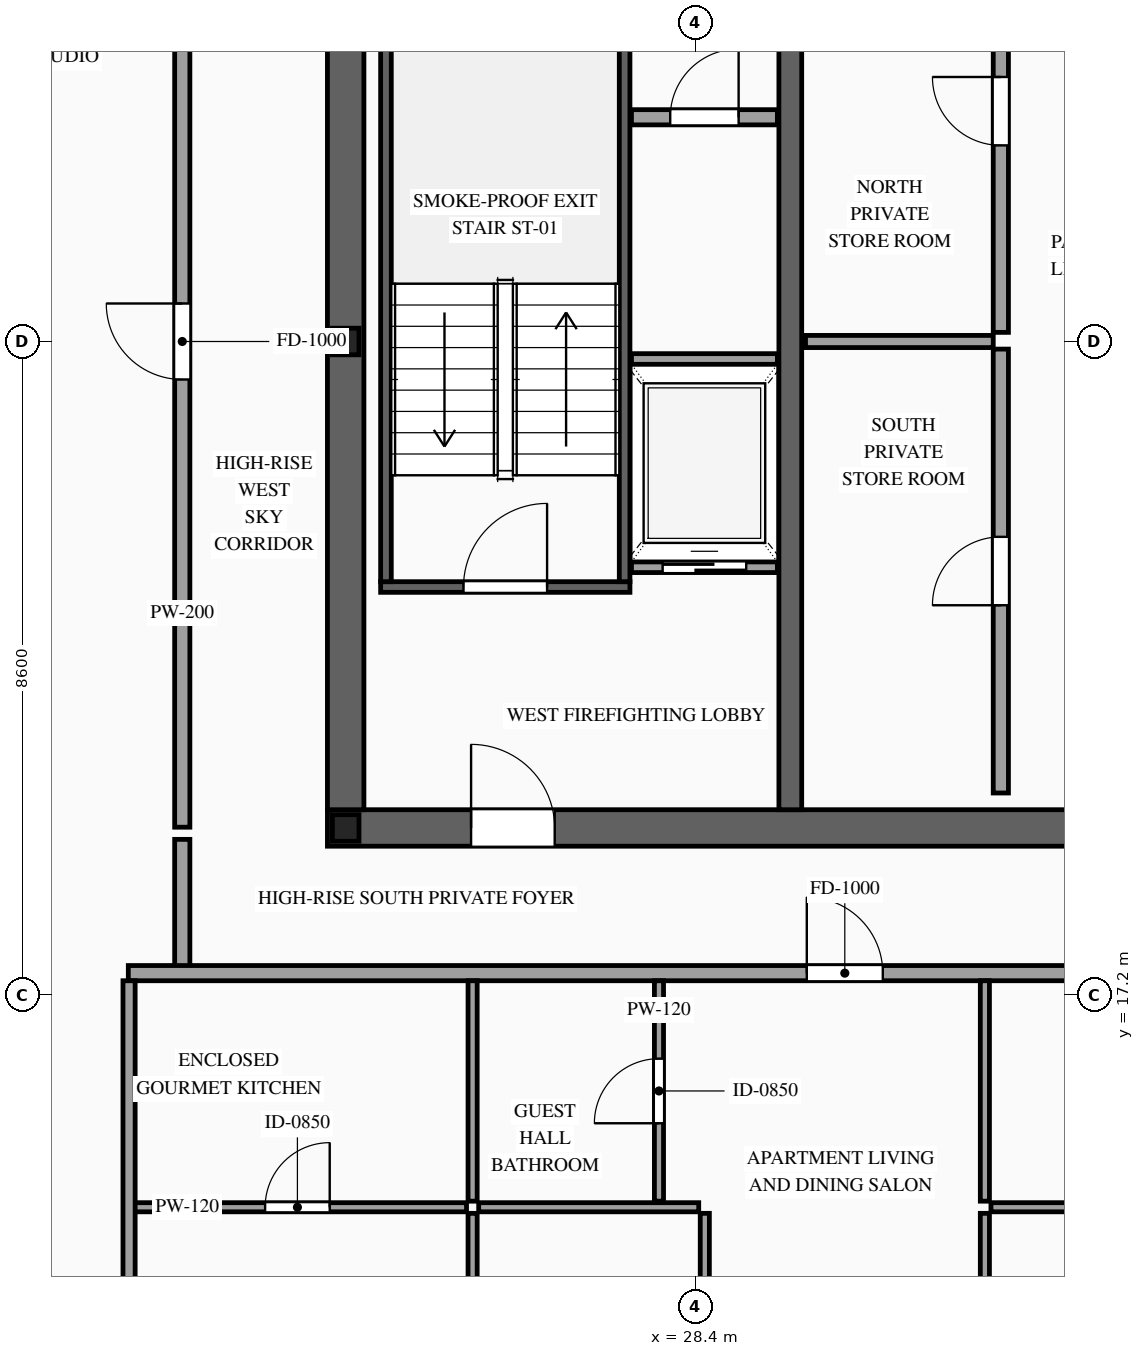
"""IFC4 building model, lengths in metres.
Left out: names, types, materials, properties, quantities, classifications, styles, units other than length and angle.
Written with IfcOpenShell. Run it as: python <this file> out.ifc"""

import sys

from ifc_helpers import new_model, si_unit, direction, frame, frame_2d, origin, origin_2d, place, context, subcontext, project, spatial, rectangle, i_section, extrude, source, transform, mapped, element, fill, save


model = new_model("IFC4")
c1 = context("Model", 3, precision=1e-05, world=origin(), true_north=direction((0.0, 1.0)))
c2 = subcontext(c1, "Body", "Model", "MODEL_VIEW")
j1 = project(units=[si_unit("LENGTHUNIT", "METRE"), si_unit("PLANEANGLEUNIT", "RADIAN")], contexts=[c1])
p1 = place(None, origin())
s1 = spatial("IfcSite", under=j1, at=p1, CompositionType="ELEMENT")
p2 = place(p1, origin())
s2 = spatial("IfcBuilding", under=s1, at=p2, CompositionType="ELEMENT")
p3 = place(p2, frame((0.0, 0.0, 303.1)))
s3 = spatial("IfcBuildingStorey", under=s2, at=p3, CompositionType="ELEMENT", Elevation=303.1)
p4 = place(p3, frame((23.56, 19.4, 0.0), z_axis=(0.0, 0.0, 1.0), x_axis=(1.0, 0.0, 0.0)))
e1 = element("IfcWall", 1, at=p4, inside=s3, PredefinedType="SHEAR", context=c2, shape_type="SweptSolid", body=[
    extrude(rectangle(XDim=26.88, YDim=0.48, at=frame_2d((13.44, 0.0))), origin(), (0.0, 0.0, 1.0), 3.5),
])
p5 = place(p4, frame((1.89, 0.0, 0.0)))
e2 = element("IfcOpeningElement", 2, at=p5, cuts=e1, PredefinedType="OPENING", context=c2, shape_type="SweptSolid", body=[
    extrude(rectangle(XDim=1.1, YDim=2.2, at=frame_2d((0.55, 1.1))), frame((0.0, 0.255, 0.0), z_axis=(0.0, -1.0, 0.0), x_axis=(1.0, 0.0, 0.0)), (0.0, 0.0, 1.0), 0.51),
])
p6 = place(p4, frame((9.79, 0.0, 0.0)))
e3 = element("IfcOpeningElement", 3, at=p6, cuts=e1, PredefinedType="OPENING", context=c2, shape_type="SweptSolid", body=[
    extrude(rectangle(XDim=1.1, YDim=2.2, at=frame_2d((0.55, 1.1))), frame((0.0, 0.255, 0.0), z_axis=(0.0, -1.0, 0.0), x_axis=(1.0, 0.0, 0.0)), (0.0, 0.0, 1.0), 0.51),
])
p7 = place(p4, frame((22.99, 0.0, 0.0)))
e4 = element("IfcOpeningElement", 4, at=p7, cuts=e1, PredefinedType="OPENING", context=c2, shape_type="SweptSolid", body=[
    extrude(rectangle(XDim=1.1, YDim=2.2, at=frame_2d((0.55, 1.1))), frame((0.0, 0.255, 0.0), z_axis=(0.0, -1.0, 0.0), x_axis=(1.0, 0.0, 0.0)), (0.0, 0.0, 1.0), 0.51),
])
p8 = place(p4, frame((19.61, 0.0, 0.0)))
e5 = element("IfcOpeningElement", 5, at=p8, cuts=e1, PredefinedType="OPENING", context=c2, shape_type="SweptSolid", body=[
    extrude(rectangle(XDim=0.9, YDim=2.15, at=frame_2d((0.45, 1.075))), frame((0.0, 0.255, 0.0), z_axis=(0.0, -1.0, 0.0), x_axis=(1.0, 0.0, 0.0)), (0.0, 0.0, 1.0), 0.51),
])
p9 = place(p4, frame((18.17, 0.0, 0.0)))
e6 = element("IfcOpeningElement", 6, at=p9, cuts=e1, PredefinedType="OPENING", context=c2, shape_type="SweptSolid", body=[
    extrude(rectangle(XDim=0.9, YDim=2.15, at=frame_2d((0.45, 1.075))), frame((0.0, 0.255, 0.0), z_axis=(0.0, -1.0, 0.0), x_axis=(1.0, 0.0, 0.0)), (0.0, 0.0, 1.0), 0.51),
])
m1 = source(origin(), c2, "Body", "SweptSolid", [
    extrude(rectangle(XDim=12.32, YDim=0.48, at=frame_2d((6.16, 0.0))), origin(), (0.0, 0.0, 1.0), 3.5),
])
p10 = place(p3, frame((23.8, 19.64, 0.0), z_axis=(0.0, 0.0, 1.0), x_axis=(0.0, 1.0, 0.0)))
e7 = element("IfcWall", 7, at=p10, inside=s3, PredefinedType="SHEAR", context=c2, shape_type="MappedRepresentation", body=[
    mapped(m1, transform((0.0, 0.0, 0.0), scale=1.0)),
])
m2 = source(origin(), c2, "Body", "SweptSolid", [
    extrude(rectangle(XDim=12.32, YDim=0.3, at=frame_2d((6.16, 0.0))), origin(), (0.0, 0.0, 1.0), 3.5),
])
p11 = place(p3, frame((29.65, 19.64, 0.0), z_axis=(0.0, 0.0, 1.0), x_axis=(0.0, 1.0, 0.0)))
e8 = element("IfcWall", 8, at=p11, inside=s3, PredefinedType="SOLIDWALL", context=c2, shape_type="MappedRepresentation", body=[
    mapped(m2, transform((0.0, 0.0, 0.0), scale=1.0)),
])
m3 = source(origin(), c2, "Body", "SweptSolid", [
    extrude(i_section(OverallWidth=0.35, OverallDepth=0.35, WebThickness=0.012, FlangeThickness=0.019, at=origin_2d()), origin(), (0.0, 0.0, 1.0), 3.5),
])
for number, where, z_axis, x_axis in (
    (9, (23.8, 19.4, 0.0), (0.0, 0.0, 1.0), (1.0, 0.0, 0.0)),
    (10, (23.8, 25.8, 0.0), (0.0, 0.0, 1.0), (1.0, 0.0, 0.0)),
):
    element("IfcColumn", number, at=place(p3, frame(where, z_axis=z_axis, x_axis=x_axis)), inside=s3, PredefinedType="COLUMN", context=c2, shape_type="MappedRepresentation", body=[
        mapped(m3, transform((0.0, 0.0, 0.0), scale=1.0)),
    ])
p12 = place(p3, frame((27.56, 22.83, 0.0), z_axis=(0.0, 0.0, 1.0), x_axis=(1.0, 0.0, 0.0)))
e11 = element("IfcWall", 11, at=p12, inside=s3, PredefinedType="SOLIDWALL", context=c2, shape_type="SweptSolid", body=[
    extrude(rectangle(XDim=1.92, YDim=0.14, at=frame_2d((0.96, 0.0))), origin(), (0.0, 0.0, 1.0), 3.22),
])
p13 = place(p12, frame((0.41, 0.0, 0.0)))
e12 = element("IfcOpeningElement", 12, at=p13, cuts=e11, PredefinedType="OPENING", context=c2, shape_type="SweptSolid", body=[
    extrude(rectangle(XDim=1.1, YDim=2.2, at=frame_2d((0.55, 1.1))), frame((0.0, 0.085, 0.0), z_axis=(0.0, -1.0, 0.0), x_axis=(1.0, 0.0, 0.0)), (0.0, 0.0, 1.0), 0.17),
])
m4 = source(origin(), c2, "Body", "SweptSolid", [
    extrude(rectangle(XDim=1.92, YDim=0.14, at=frame_2d((0.96, 0.0))), origin(), (0.0, 0.0, 1.0), 3.22),
])
p14 = place(p3, frame((27.56, 25.57, 0.0), z_axis=(0.0, 0.0, 1.0), x_axis=(1.0, 0.0, 0.0)))
e13 = element("IfcWall", 13, at=p14, inside=s3, PredefinedType="SOLIDWALL", context=c2, shape_type="MappedRepresentation", body=[
    mapped(m4, transform((0.0, 0.0, 0.0), scale=1.0)),
])
p15 = place(p3, frame((24.26, 22.57, 0.0), z_axis=(0.0, 0.0, 1.0), x_axis=(1.0, 0.0, 0.0)))
e14 = element("IfcWall", 14, at=p15, inside=s3, PredefinedType="SOLIDWALL", context=c2, shape_type="SweptSolid", body=[
    extrude(rectangle(XDim=3.28, YDim=0.14, at=frame_2d((1.64, 0.0))), origin(), (0.0, 0.0, 1.0), 3.22),
])
p16 = place(p15, frame((1.09, 0.0, 0.0)))
e15 = element("IfcOpeningElement", 15, at=p16, cuts=e14, PredefinedType="OPENING", context=c2, shape_type="SweptSolid", body=[
    extrude(rectangle(XDim=1.1, YDim=2.2, at=frame_2d((0.55, 1.1))), frame((0.0, 0.085, 0.0), z_axis=(0.0, -1.0, 0.0), x_axis=(1.0, 0.0, 0.0)), (0.0, 0.0, 1.0), 0.17),
])
m5 = source(origin(), c2, "Body", "SweptSolid", [
    extrude(rectangle(XDim=8.94, YDim=0.14, at=frame_2d((4.47, 0.0))), origin(), (0.0, 0.0, 1.0), 3.22),
])
for number, where, z_axis, x_axis in (
    (16, (24.33, 22.64, 0.0), (0.0, 0.0, 1.0), (0.0, 1.0, 0.0)),
    (17, (27.47, 22.64, 0.0), (0.0, 0.0, 1.0), (0.0, 1.0, 0.0)),
):
    element("IfcWall", number, at=place(p3, frame(where, z_axis=z_axis, x_axis=x_axis)), inside=s3, PredefinedType="SOLIDWALL", context=c2, shape_type="MappedRepresentation", body=[
        mapped(m5, transform((0.0, 0.0, 0.0), scale=1.0)),
    ])
p17 = place(p3, frame((27.56, 28.75, 0.0), z_axis=(0.0, 0.0, 1.0), x_axis=(1.0, 0.0, 0.0)))
e18 = element("IfcWall", 18, at=p17, inside=s3, PredefinedType="PARTITIONING", context=c2, shape_type="SweptSolid", body=[
    extrude(rectangle(XDim=1.92, YDim=0.2, at=frame_2d((0.96, 0.0))), origin(), (0.0, 0.0, 1.0), 3.22),
])
p18 = place(p17, frame((0.51, 0.0, 0.0)))
e19 = element("IfcOpeningElement", 19, at=p18, cuts=e18, PredefinedType="OPENING", context=c2, shape_type="SweptSolid", body=[
    extrude(rectangle(XDim=0.9, YDim=2.15, at=frame_2d((0.45, 1.075))), frame((0.0, 0.115, 0.0), z_axis=(0.0, -1.0, 0.0), x_axis=(1.0, 0.0, 0.0)), (0.0, 0.0, 1.0), 0.23),
])
p19 = place(p3, frame((32.42, 19.86, 0.0), z_axis=(0.0, 0.0, 1.0), x_axis=(0.0, 1.0, 0.0)))
e20 = element("IfcWall", 20, at=p19, inside=s3, PredefinedType="PARTITIONING", context=c2, shape_type="SweptSolid", body=[
    extrude(rectangle(XDim=5.84, YDim=0.2, at=frame_2d((2.92, 0.0))), origin(), (0.0, 0.0, 1.0), 3.22),
])
p20 = place(p19, frame((2.47, 0.0, 0.0)))
e21 = element("IfcOpeningElement", 21, at=p20, cuts=e20, PredefinedType="OPENING", context=c2, shape_type="SweptSolid", body=[
    extrude(rectangle(XDim=0.9, YDim=2.15, at=frame_2d((0.45, 1.075))), frame((0.0, 0.115, 0.0), z_axis=(0.0, -1.0, 0.0), x_axis=(1.0, 0.0, 0.0)), (0.0, 0.0, 1.0), 0.23),
])
p21 = place(p3, frame((32.42, 25.92, 0.0), z_axis=(0.0, 0.0, 1.0), x_axis=(0.0, 1.0, 0.0)))
e22 = element("IfcWall", 22, at=p21, inside=s3, PredefinedType="PARTITIONING", context=c2, shape_type="SweptSolid", body=[
    extrude(rectangle(XDim=5.82, YDim=0.2, at=frame_2d((2.91, 0.0))), origin(), (0.0, 0.0, 1.0), 3.22),
])
p22 = place(p21, frame((2.46, 0.0, 0.0)))
e23 = element("IfcOpeningElement", 23, at=p22, cuts=e22, PredefinedType="OPENING", context=c2, shape_type="SweptSolid", body=[
    extrude(rectangle(XDim=0.9, YDim=2.15, at=frame_2d((0.45, 1.075))), frame((0.0, 0.115, 0.0), z_axis=(0.0, -1.0, 0.0), x_axis=(1.0, 0.0, 0.0)), (0.0, 0.0, 1.0), 0.23),
])
m6 = source(origin(), c2, "Body", "SweptSolid", [
    extrude(rectangle(XDim=2.47, YDim=0.16, at=frame_2d((1.235, 0.0))), origin(), (0.0, 0.0, 1.0), 3.22),
])
p23 = place(p3, frame((29.85, 25.8, 0.0), z_axis=(0.0, 0.0, 1.0), x_axis=(1.0, 0.0, 0.0)))
e24 = element("IfcWall", 24, at=p23, inside=s3, PredefinedType="PARTITIONING", context=c2, shape_type="MappedRepresentation", body=[
    mapped(m6, transform((0.0, 0.0, 0.0), scale=1.0)),
])
m7 = source(origin(), c2, "Body", "SweptSolid", [
    extrude(rectangle(XDim=1.7, YDim=0.2, at=frame_2d((0.85, 0.0))), origin(), (0.0, 0.0, 1.0), 3.22),
])
p24 = place(p3, frame((21.65, 17.55, 0.0), z_axis=(0.0, 0.0, 1.0), x_axis=(0.0, 1.0, 0.0)))
e25 = element("IfcWall", 25, at=p24, inside=s3, PredefinedType="PARTITIONING", context=c2, shape_type="MappedRepresentation", body=[
    mapped(m7, transform((0.0, 0.0, 0.0), scale=1.0)),
])
p25 = place(p3, frame((20.94, 17.49, 0.0), z_axis=(0.0, 0.0, 1.0), x_axis=(1.0, 0.0, 0.0)))
e26 = element("IfcWall", 26, at=p25, inside=s3, PredefinedType="PARTITIONING", context=c2, shape_type="SweptSolid", body=[
    extrude(rectangle(XDim=15.338, YDim=0.2, at=frame_2d((7.669, 0.0))), origin(), (0.0, 0.0, 1.0), 3.22),
])
p26 = place(p25, frame((8.927, 0.0, 0.0)))
e27 = element("IfcOpeningElement", 27, at=p26, cuts=e26, PredefinedType="OPENING", context=c2, shape_type="SweptSolid", body=[
    extrude(rectangle(XDim=1.0, YDim=2.2, at=frame_2d((0.5, 1.1))), frame((0.0, 0.115, 0.0), z_axis=(0.0, -1.0, 0.0), x_axis=(1.0, 0.0, 0.0)), (0.0, 0.0, 1.0), 0.23),
])
p27 = place(p3, frame((20.94, 14.41, 0.0), z_axis=(0.0, 0.0, 1.0), x_axis=(1.0, 0.0, 0.0)))
e28 = element("IfcWall", 28, at=p27, inside=s3, PredefinedType="PARTITIONING", context=c2, shape_type="SweptSolid", body=[
    extrude(rectangle(XDim=4.45, YDim=0.12, at=frame_2d((2.225, 0.0))), origin(), (0.0, 0.0, 1.0), 3.22),
])
p28 = place(p27, frame((1.8, 0.0, 0.0)))
e29 = element("IfcOpeningElement", 29, at=p28, cuts=e28, PredefinedType="OPENING", context=c2, shape_type="SweptSolid", body=[
    extrude(rectangle(XDim=0.85, YDim=2.1, at=frame_2d((0.425, 1.05))), frame((0.0, 0.075, 0.0), z_axis=(0.0, -1.0, 0.0), x_axis=(1.0, 0.0, 0.0)), (0.0, 0.0, 1.0), 0.15),
])
m8 = source(origin(), c2, "Body", "SweptSolid", [
    extrude(rectangle(XDim=2.9, YDim=0.12, at=frame_2d((1.45, 0.0))), origin(), (0.0, 0.0, 1.0), 3.22),
])
p29 = place(p3, frame((25.47, 14.49, 0.0), z_axis=(0.0, 0.0, 1.0), x_axis=(0.0, 1.0, 0.0)))
e30 = element("IfcWall", 30, at=p29, inside=s3, PredefinedType="PARTITIONING", context=c2, shape_type="MappedRepresentation", body=[
    mapped(m8, transform((0.0, 0.0, 0.0), scale=1.0)),
])
p30 = place(p3, frame((27.922, 14.49, 0.0), z_axis=(0.0, 0.0, 1.0), x_axis=(0.0, 1.0, 0.0)))
e31 = element("IfcWall", 31, at=p30, inside=s3, PredefinedType="PARTITIONING", context=c2, shape_type="SweptSolid", body=[
    extrude(rectangle(XDim=2.9, YDim=0.12, at=frame_2d((1.45, 0.0))), origin(), (0.0, 0.0, 1.0), 3.22),
])
p31 = place(p30, frame((1.025, 0.0, 0.0)))
e32 = element("IfcOpeningElement", 32, at=p31, cuts=e31, PredefinedType="OPENING", context=c2, shape_type="SweptSolid", body=[
    extrude(rectangle(XDim=0.85, YDim=2.1, at=frame_2d((0.425, 1.05))), frame((0.0, 0.075, 0.0), z_axis=(0.0, -1.0, 0.0), x_axis=(1.0, 0.0, 0.0)), (0.0, 0.0, 1.0), 0.15),
])
p32 = place(p3, frame((32.29, 14.41, 0.0), z_axis=(0.0, 0.0, 1.0), x_axis=(1.0, 0.0, 0.0)))
e33 = element("IfcWall", 33, at=p32, inside=s3, PredefinedType="PARTITIONING", context=c2, shape_type="SweptSolid", body=[
    extrude(rectangle(XDim=3.988, YDim=0.12, at=frame_2d((1.994, 0.0))), origin(), (0.0, 0.0, 1.0), 3.22),
])
p33 = place(p32, frame((1.569, 0.0, 0.0)))
e34 = element("IfcOpeningElement", 34, at=p33, cuts=e33, PredefinedType="OPENING", context=c2, shape_type="SweptSolid", body=[
    extrude(rectangle(XDim=0.85, YDim=2.1, at=frame_2d((0.425, 1.05))), frame((0.0, 0.075, 0.0), z_axis=(0.0, -1.0, 0.0), x_axis=(1.0, 0.0, 0.0)), (0.0, 0.0, 1.0), 0.15),
])
p34 = place(p3, frame((32.21, 14.49, 0.0), z_axis=(0.0, 0.0, 1.0), x_axis=(0.0, 1.0, 0.0)))
e35 = element("IfcWall", 35, at=p34, inside=s3, PredefinedType="PARTITIONING", context=c2, shape_type="MappedRepresentation", body=[
    mapped(m8, transform((0.0, 0.0, 0.0), scale=1.0)),
])
p35 = place(p3, frame((25.47, 6.85, 0.0), z_axis=(0.0, 0.0, 1.0), x_axis=(0.0, 1.0, 0.0)))
e36 = element("IfcWall", 36, at=p35, inside=s3, PredefinedType="PARTITIONING", context=c2, shape_type="SweptSolid", body=[
    extrude(rectangle(XDim=7.48, YDim=0.12, at=frame_2d((3.74, 0.0))), origin(), (0.0, 0.0, 1.0), 3.22),
])
p36 = place(p35, frame((3.29, 0.0, 0.0)))
e37 = element("IfcOpeningElement", 37, at=p36, cuts=e36, PredefinedType="OPENING", context=c2, shape_type="SweptSolid", body=[
    extrude(rectangle(XDim=0.9, YDim=2.15, at=frame_2d((0.45, 1.075))), frame((0.0, 0.075, 0.0), z_axis=(0.0, -1.0, 0.0), x_axis=(1.0, 0.0, 0.0)), (0.0, 0.0, 1.0), 0.15),
])
p37 = place(p3, frame((32.21, 6.85, 0.0), z_axis=(0.0, 0.0, 1.0), x_axis=(0.0, 1.0, 0.0)))
e38 = element("IfcWall", 38, at=p37, inside=s3, PredefinedType="PARTITIONING", context=c2, shape_type="SweptSolid", body=[
    extrude(rectangle(XDim=7.48, YDim=0.12, at=frame_2d((3.74, 0.0))), origin(), (0.0, 0.0, 1.0), 3.22),
])
p38 = place(p37, frame((3.29, 0.0, 0.0)))
e39 = element("IfcOpeningElement", 39, at=p38, cuts=e38, PredefinedType="OPENING", context=c2, shape_type="SweptSolid", body=[
    extrude(rectangle(XDim=0.9, YDim=2.15, at=frame_2d((0.45, 1.075))), frame((0.0, 0.075, 0.0), z_axis=(0.0, -1.0, 0.0), x_axis=(1.0, 0.0, 0.0)), (0.0, 0.0, 1.0), 0.15),
])
m9 = source(origin(), c2, "Body", "SweptSolid", [
    extrude(rectangle(XDim=2.895, YDim=0.12, at=frame_2d((1.448, 0.0))), origin(), (0.0, 0.0, 1.0), 3.22),
])
p39 = place(p3, frame((25.55, 14.41, 0.0), z_axis=(0.0, 0.0, 1.0), x_axis=(1.0, 0.0, 0.0)))
e40 = element("IfcWall", 40, at=p39, inside=s3, PredefinedType="PARTITIONING", context=c2, shape_type="MappedRepresentation", body=[
    mapped(m9, transform((0.0, 0.0, 0.0), scale=1.0)),
])
p40 = place(p3, frame((28.525, 6.85, 0.0), z_axis=(0.0, 0.0, 1.0), x_axis=(0.0, 1.0, 0.0)))
e41 = element("IfcWall", 41, at=p40, inside=s3, PredefinedType="PARTITIONING", context=c2, shape_type="SweptSolid", body=[
    extrude(rectangle(XDim=7.48, YDim=0.12, at=frame_2d((3.74, 0.0))), origin(), (0.0, 0.0, 1.0), 3.22),
])
p41 = place(p40, frame((3.29, 0.0, 0.0)))
e42 = element("IfcOpeningElement", 42, at=p41, cuts=e41, PredefinedType="OPENING", context=c2, shape_type="SweptSolid", body=[
    extrude(rectangle(XDim=0.9, YDim=2.15, at=frame_2d((0.45, 1.075))), frame((0.0, 0.075, 0.0), z_axis=(0.0, -1.0, 0.0), x_axis=(1.0, 0.0, 0.0)), (0.0, 0.0, 1.0), 0.15),
])
m10 = source(origin(), c2, "Body", "SweptSolid", [
    extrude(rectangle(XDim=10.39, YDim=0.16, at=frame_2d((5.195, 0.0))), origin(), (0.0, 0.0, 1.0), 3.22),
])
p42 = place(p3, frame((20.95, 7.0, 0.0), z_axis=(0.0, 0.0, 1.0), x_axis=(0.0, 1.0, 0.0)))
e43 = element("IfcWall", 43, at=p42, inside=s3, PredefinedType="PARTITIONING", context=c2, shape_type="MappedRepresentation", body=[
    mapped(m10, transform((0.0, 0.0, 0.0), scale=1.0)),
])
p43 = place(p3, frame((21.65, 19.41, 0.0), z_axis=(0.0, 0.0, 1.0), x_axis=(0.0, 1.0, 0.0)))
e44 = element("IfcWall", 44, at=p43, inside=s3, PredefinedType="PARTITIONING", context=c2, shape_type="SweptSolid", body=[
    extrude(rectangle(XDim=12.78, YDim=0.2, at=frame_2d((6.39, 0.0))), origin(), (0.0, 0.0, 1.0), 3.22),
])
p44 = place(p43, frame((5.89, 0.0, 0.0)))
e45 = element("IfcOpeningElement", 45, at=p44, cuts=e44, PredefinedType="OPENING", context=c2, shape_type="SweptSolid", body=[
    extrude(rectangle(XDim=1.0, YDim=2.2, at=frame_2d((0.5, 1.1))), frame((0.0, 0.115, 0.0), z_axis=(0.0, -1.0, 0.0), x_axis=(1.0, 0.0, 0.0)), (0.0, 0.0, 1.0), 0.23),
])
m11 = source(origin(), c2, "Body", "SweptSolid", [
    extrude(rectangle(XDim=1.1, YDim=2.2, at=frame_2d((0.55, 1.1))), frame((0.0, 0.025, 0.0), z_axis=(0.0, -1.0, 0.0), x_axis=(1.0, 0.0, 0.0)), (0.0, 0.0, 1.0), 0.05),
])
p45 = place(p13, origin())
e46 = element("IfcDoor", 46, at=p45, inside=s3, OperationType="SLIDING_TO_LEFT", PredefinedType="DOOR", context=c2, shape_type="MappedRepresentation", body=[
    mapped(m11, transform((0.0, 0.0, 0.0), scale=1.0)),
])
fill(e12, e46)
m12 = source(origin(), c2, "Body", "SweptSolid", [
    extrude(rectangle(XDim=1.1, YDim=2.2, at=frame_2d((0.55, 1.1))), frame((0.0, 0.025, 0.0), z_axis=(0.0, -1.0, 0.0), x_axis=(1.0, 0.0, 0.0)), (0.0, 0.0, 1.0), 0.05),
])
p46 = place(p16, origin())
e47 = element("IfcDoor", 47, at=p46, inside=s3, OperationType="SINGLE_SWING_RIGHT", PredefinedType="DOOR", context=c2, shape_type="MappedRepresentation", body=[
    mapped(m12, transform((0.0, 0.0, 0.0), scale=1.0)),
])
fill(e15, e47)
p47 = place(p5, origin())
e48 = element("IfcDoor", 48, at=p47, inside=s3, OperationType="SINGLE_SWING_LEFT", PredefinedType="DOOR", context=c2, shape_type="MappedRepresentation", body=[
    mapped(m12, transform((0.0, 0.0, 0.0), scale=1.0)),
])
fill(e2, e48)
m13 = source(origin(), c2, "Body", "SweptSolid", [
    extrude(rectangle(XDim=0.9, YDim=2.15, at=frame_2d((0.45, 1.075))), frame((0.0, 0.025, 0.0), z_axis=(0.0, -1.0, 0.0), x_axis=(1.0, 0.0, 0.0)), (0.0, 0.0, 1.0), 0.05),
])
p48 = place(p18, origin())
e49 = element("IfcDoor", 49, at=p48, inside=s3, OperationType="SINGLE_SWING_RIGHT", PredefinedType="DOOR", context=c2, shape_type="MappedRepresentation", body=[
    mapped(m13, transform((0.0, 0.0, 0.0), scale=1.0)),
])
fill(e19, e49)
p49 = place(p20, origin())
e50 = element("IfcDoor", 50, at=p49, inside=s3, OperationType="SINGLE_SWING_LEFT", PredefinedType="DOOR", context=c2, shape_type="MappedRepresentation", body=[
    mapped(m13, transform((0.0, 0.0, 0.0), scale=1.0)),
])
fill(e21, e50)
p50 = place(p22, origin())
e51 = element("IfcDoor", 51, at=p50, inside=s3, OperationType="SINGLE_SWING_RIGHT", PredefinedType="DOOR", context=c2, shape_type="MappedRepresentation", body=[
    mapped(m13, transform((0.0, 0.0, 0.0), scale=1.0)),
])
fill(e23, e51)
m14 = source(origin(), c2, "Body", "SweptSolid", [
    extrude(rectangle(XDim=1.0, YDim=2.2, at=frame_2d((0.5, 1.1))), frame((0.0, 0.025, 0.0), z_axis=(0.0, -1.0, 0.0), x_axis=(1.0, 0.0, 0.0)), (0.0, 0.0, 1.0), 0.05),
])
p51 = place(p26, origin())
e52 = element("IfcDoor", 52, at=p51, inside=s3, OperationType="SINGLE_SWING_LEFT", PredefinedType="DOOR", context=c2, shape_type="MappedRepresentation", body=[
    mapped(m14, transform((0.0, 0.0, 0.0), scale=1.0)),
])
fill(e27, e52)
m15 = source(origin(), c2, "Body", "SweptSolid", [
    extrude(rectangle(XDim=0.85, YDim=2.1, at=frame_2d((0.425, 1.05))), frame((0.0, 0.025, 0.0), z_axis=(0.0, -1.0, 0.0), x_axis=(1.0, 0.0, 0.0)), (0.0, 0.0, 1.0), 0.05),
])
p52 = place(p28, origin())
e53 = element("IfcDoor", 53, at=p52, inside=s3, OperationType="SINGLE_SWING_RIGHT", PredefinedType="DOOR", context=c2, shape_type="MappedRepresentation", body=[
    mapped(m15, transform((0.0, 0.0, 0.0), scale=1.0)),
])
fill(e29, e53)
p53 = place(p31, origin())
e54 = element("IfcDoor", 54, at=p53, inside=s3, OperationType="SINGLE_SWING_LEFT", PredefinedType="DOOR", context=c2, shape_type="MappedRepresentation", body=[
    mapped(m15, transform((0.0, 0.0, 0.0), scale=1.0)),
])
fill(e32, e54)
p54 = place(p44, origin())
e55 = element("IfcDoor", 55, at=p54, inside=s3, OperationType="SINGLE_SWING_RIGHT", PredefinedType="DOOR", context=c2, shape_type="MappedRepresentation", body=[
    mapped(m14, transform((0.0, 0.0, 0.0), scale=1.0)),
])
fill(e45, e55)
save(model, sys.argv[1])
